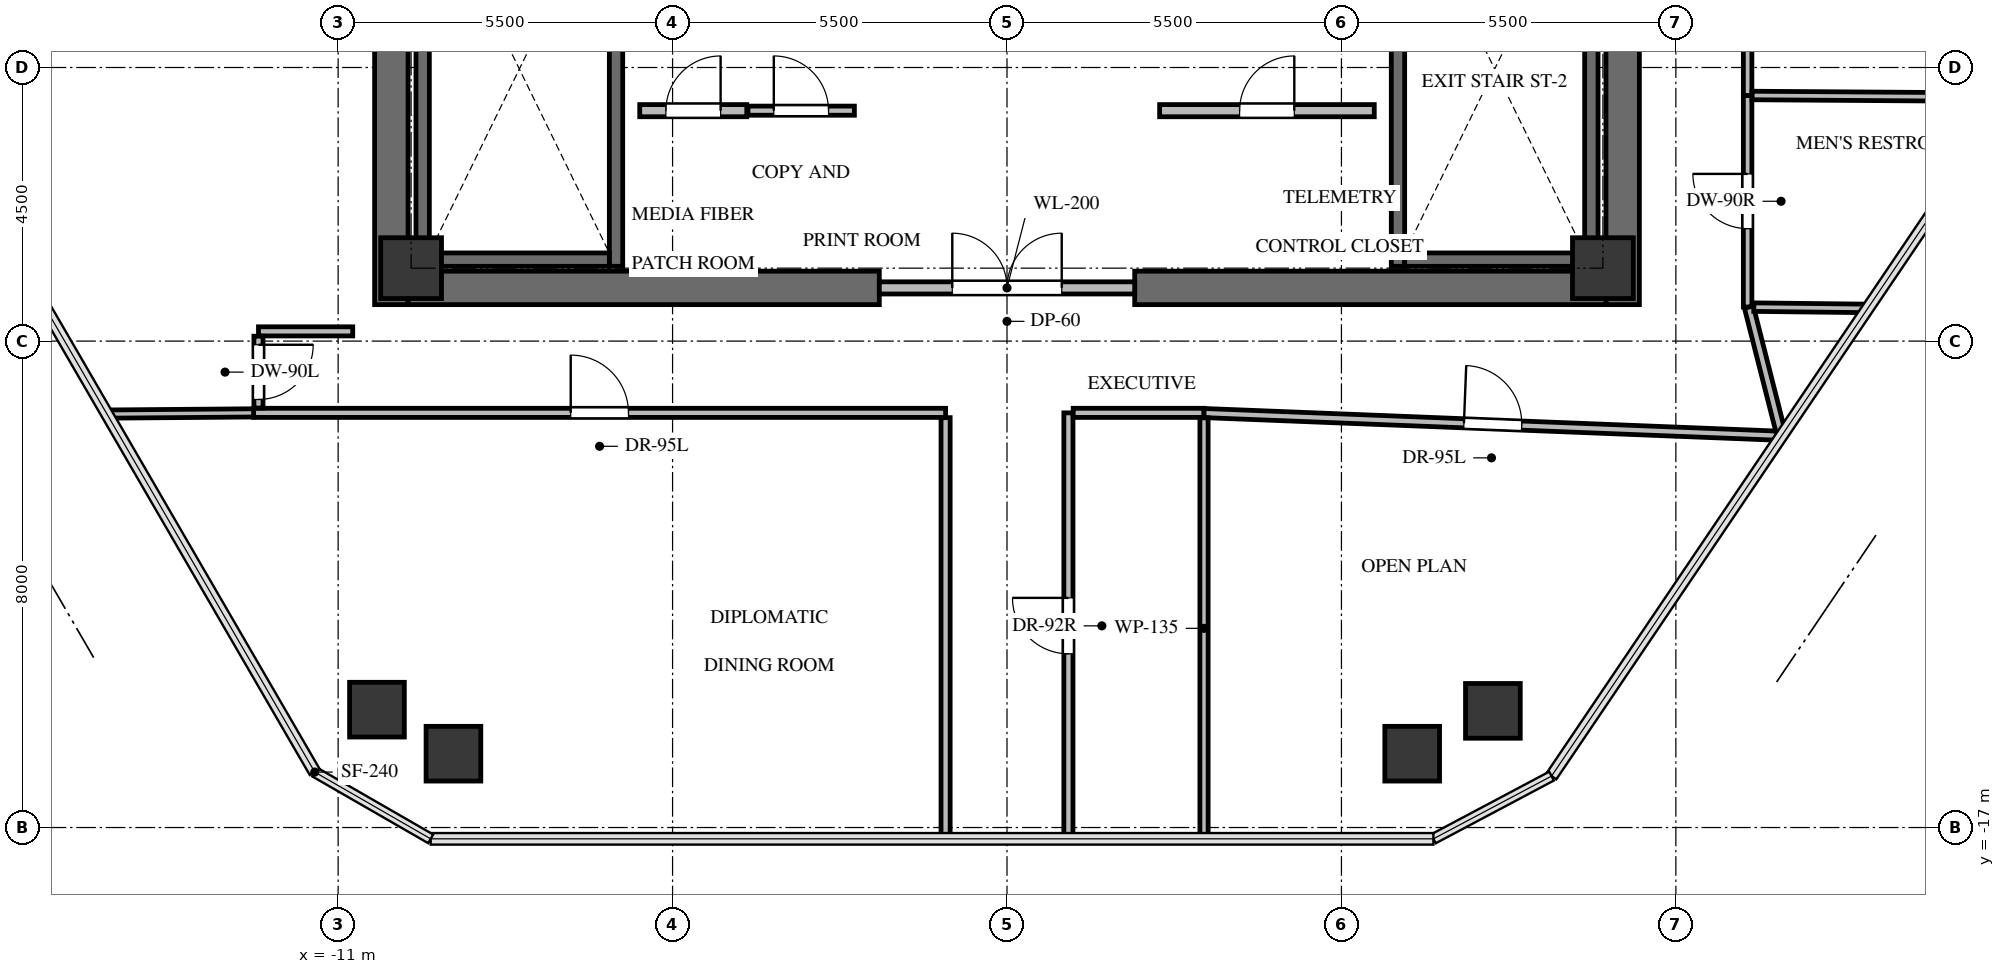
"""IFC4 building model, lengths in metres.
Left out: names, types, materials, properties, quantities, classifications, styles, units other than length and angle.
Written with IfcOpenShell. Run it as: python <this file> out.ifc"""

import sys

from ifc_helpers import new_model, si_unit, direction, frame, frame_2d, origin, origin_2d, place, context, subcontext, project, spatial, rectangle, extrude, source, transform, mapped, element, fill, save


model = new_model("IFC4")
c1 = context("Model", 3, precision=1e-05, world=origin(), true_north=direction((0.0, 1.0)))
c2 = subcontext(c1, "Body", "Model", "MODEL_VIEW")
j1 = project(units=[si_unit("LENGTHUNIT", "METRE"), si_unit("PLANEANGLEUNIT", "RADIAN")], contexts=[c1])
p1 = place(None, origin())
s1 = spatial("IfcSite", under=j1, at=p1, CompositionType="ELEMENT")
p2 = place(p1, origin())
s2 = spatial("IfcBuilding", under=s1, at=p2, CompositionType="ELEMENT")
p3 = place(p2, frame((0.0, 0.0, 221.6)))
s3 = spatial("IfcBuildingStorey", under=s2, at=p3, CompositionType="ELEMENT", Elevation=221.6)
for number, where, z_axis, x_axis in (
    (1, (-10.125, -8.4, 0.0), (0.0, 0.0, 1.0), (0.0, 1.0, 0.0)),
    (2, (10.125, -8.4, 0.0), (0.0, 0.0, 1.0), (0.0, 1.0, 0.0)),
):
    element("IfcWall", number, at=place(p3, frame(where, z_axis=z_axis, x_axis=x_axis)), inside=s3, PredefinedType="SHEAR", context=c2, shape_type="SweptSolid", body=[
        extrude(rectangle(XDim=16.8, YDim=0.55, at=frame_2d((8.4, 0.0))), origin(), (0.0, 0.0, 1.0), 3.3),
    ])
for number, where, z_axis, x_axis in (
    (3, (-9.85, -8.125, 0.0), (0.0, 0.0, 1.0), (1.0, 0.0, 0.0)),
    (4, (2.1, -8.125, 0.0), (0.0, 0.0, 1.0), (1.0, 0.0, 0.0)),
):
    element("IfcWall", number, at=place(p3, frame(where, z_axis=z_axis, x_axis=x_axis)), inside=s3, PredefinedType="SHEAR", context=c2, shape_type="SweptSolid", body=[
        extrude(rectangle(XDim=7.75, YDim=0.55, at=frame_2d((3.875, 0.0))), origin(), (0.0, 0.0, 1.0), 3.3),
    ])
p4 = place(p3, frame((-6.43, -7.77, -0.24), z_axis=(0.0, 0.0, 1.0), x_axis=(0.0, 1.0, 0.0)))
e5 = element("IfcWall", 5, at=p4, inside=s3, PredefinedType="SHEAR", context=c2, shape_type="SweptSolid", body=[
    extrude(rectangle(XDim=7.89, YDim=0.22, at=frame_2d((3.945, 0.0))), origin(), (0.0, 0.0, 1.0), 3.3),
])
p5 = place(p4, frame((6.32, 0.0, 0.0)))
e6 = element("IfcOpeningElement", 6, at=p5, cuts=e5, PredefinedType="OPENING", context=c2, shape_type="SweptSolid", body=[
    extrude(rectangle(XDim=1.05, YDim=2.15, at=frame_2d((0.525, 1.075))), frame((0.0, 0.12, 0.0), z_axis=(0.0, -1.0, 0.0), x_axis=(1.0, 0.0, 0.0)), (0.0, 0.0, 1.0), 0.24),
])
p6 = place(p3, frame((-9.61, 0.12, -0.24), z_axis=(0.0, 0.0, 1.0), x_axis=(0.0, -1.0, 0.0)))
e7 = element("IfcWall", 7, at=p6, inside=s3, PredefinedType="SHEAR", context=c2, shape_type="SweptSolid", body=[
    extrude(rectangle(XDim=7.89, YDim=0.22, at=frame_2d((3.945, 0.0))), origin(), (0.0, 0.0, 1.0), 3.3),
])
p7 = place(p3, frame((-9.5, -7.66, -0.24), z_axis=(0.0, 0.0, 1.0), x_axis=(1.0, 0.0, 0.0)))
e8 = element("IfcWall", 8, at=p7, inside=s3, PredefinedType="SHEAR", context=c2, shape_type="SweptSolid", body=[
    extrude(rectangle(XDim=2.96, YDim=0.22, at=frame_2d((1.48, 0.0))), origin(), (0.0, 0.0, 1.0), 3.3),
])
p8 = place(p3, frame((9.61, -7.77, -0.24), z_axis=(0.0, 0.0, 1.0), x_axis=(0.0, 1.0, 0.0)))
e9 = element("IfcWall", 9, at=p8, inside=s3, PredefinedType="SHEAR", context=c2, shape_type="SweptSolid", body=[
    extrude(rectangle(XDim=7.89, YDim=0.22, at=frame_2d((3.945, 0.0))), origin(), (0.0, 0.0, 1.0), 3.3),
])
p9 = place(p3, frame((6.43, 0.12, -0.24), z_axis=(0.0, 0.0, 1.0), x_axis=(0.0, -1.0, 0.0)))
e10 = element("IfcWall", 10, at=p9, inside=s3, PredefinedType="SHEAR", context=c2, shape_type="SweptSolid", body=[
    extrude(rectangle(XDim=7.89, YDim=0.22, at=frame_2d((3.945, 0.0))), origin(), (0.0, 0.0, 1.0), 3.3),
])
p10 = place(p9, frame((0.52, 0.0, 0.0)))
e11 = element("IfcOpeningElement", 11, at=p10, cuts=e10, PredefinedType="OPENING", context=c2, shape_type="SweptSolid", body=[
    extrude(rectangle(XDim=1.05, YDim=2.15, at=frame_2d((0.525, 1.075))), frame((0.0, 0.12, 0.0), z_axis=(0.0, -1.0, 0.0), x_axis=(1.0, 0.0, 0.0)), (0.0, 0.0, 1.0), 0.24),
])
p11 = place(p3, frame((6.54, -7.66, -0.24), z_axis=(0.0, 0.0, 1.0), x_axis=(1.0, 0.0, 0.0)))
e12 = element("IfcWall", 12, at=p11, inside=s3, PredefinedType="SHEAR", context=c2, shape_type="SweptSolid", body=[
    extrude(rectangle(XDim=2.96, YDim=0.22, at=frame_2d((1.48, 0.0))), origin(), (0.0, 0.0, 1.0), 3.3),
])
m1 = source(origin(), c2, "Body", "SweptSolid", [
    extrude(rectangle(XDim=1.0, YDim=1.0, at=origin_2d()), origin(), (0.0, 0.0, 1.0), 3.3),
])
for number, where, z_axis, x_axis in (
    (13, (-9.8, -7.8, -0.24), (0.0, 0.0, 1.0), (1.0, 0.0, 0.0)),
    (14, (9.8, -7.8, -0.24), (0.0, 0.0, 1.0), (1.0, 0.0, 0.0)),
):
    element("IfcColumn", number, at=place(p3, frame(where, z_axis=z_axis, x_axis=x_axis)), inside=s3, PredefinedType="COLUMN", context=c2, shape_type="MappedRepresentation", body=[
        mapped(m1, transform((0.0, 0.0, 0.0), x_axis=(1.0, 0.0, 0.0), y_axis=(0.0, 1.0, 0.0), z_axis=(0.0, 0.0, 1.0), scale=1.0)),
    ])
m2 = source(origin(), c2, "Body", "SweptSolid", [
    extrude(rectangle(XDim=0.9, YDim=0.9, at=origin_2d()), origin(), (0.0, 0.0, 1.0), 3.3),
])
for number, where, z_axis, x_axis in (
    (15, (-10.361, -15.062, -0.24), (0.0, 0.0, 1.0), (1.0, 0.0, 0.0)),
    (16, (7.991, -15.081, -0.24), (0.0, 0.0, 1.0), (1.0, 0.0, 0.0)),
    (17, (6.664, -15.786, -0.24), (0.0, 0.0, 1.0), (1.0, 0.0, 0.0)),
    (18, (-9.104, -15.786, -0.24), (0.0, 0.0, 1.0), (1.0, 0.0, 0.0)),
):
    element("IfcColumn", number, at=place(p3, frame(where, z_axis=z_axis, x_axis=x_axis)), inside=s3, PredefinedType="COLUMN", context=c2, shape_type="MappedRepresentation", body=[
        mapped(m2, transform((0.0, 0.0, 0.0), x_axis=(1.0, 0.0, 0.0), y_axis=(0.0, 1.0, 0.0), z_axis=(0.0, 0.0, 1.0), scale=1.0)),
    ])
p12 = place(p3, frame((-2.1, -8.125, 0.0), z_axis=(0.0, 0.0, 1.0), x_axis=(1.0, 0.0, 0.0)))
e19 = element("IfcWall", 19, at=p12, inside=s3, PredefinedType="SOLIDWALL", context=c2, shape_type="SweptSolid", body=[
    extrude(rectangle(XDim=4.2, YDim=0.2, at=frame_2d((2.1, 0.0))), origin(), (0.0, 0.0, 1.0), 3.045),
])
p13 = place(p12, frame((1.2, 0.0, 0.0)))
e20 = element("IfcOpeningElement", 20, at=p13, cuts=e19, PredefinedType="OPENING", context=c2, shape_type="SweptSolid", body=[
    extrude(rectangle(XDim=1.8, YDim=2.15, at=frame_2d((0.9, 1.075))), frame((0.0, 0.11, 0.0), z_axis=(0.0, -1.0, 0.0), x_axis=(1.0, 0.0, 0.0)), (0.0, 0.0, 1.0), 0.22),
])
p14 = place(p3, frame((-6.04, -5.21, 0.0), z_axis=(0.0, 0.0, 1.0), x_axis=(1.0, 0.0, 0.0)))
e21 = element("IfcWall", 21, at=p14, inside=s3, PredefinedType="SOLIDWALL", context=c2, shape_type="SweptSolid", body=[
    extrude(rectangle(XDim=1.76, YDim=0.2, at=frame_2d((0.88, 0.0))), origin(), (0.0, 0.0, 1.0), 3.045),
])
p15 = place(p14, frame((0.43, 0.0, 0.0)))
e22 = element("IfcOpeningElement", 22, at=p15, cuts=e21, PredefinedType="OPENING", context=c2, shape_type="SweptSolid", body=[
    extrude(rectangle(XDim=0.9, YDim=2.05, at=frame_2d((0.45, 1.025))), frame((0.0, 0.11, 0.0), z_axis=(0.0, -1.0, 0.0), x_axis=(1.0, 0.0, 0.0)), (0.0, 0.0, 1.0), 0.22),
])
p16 = place(p3, frame((-4.26, -5.21, 0.0), z_axis=(0.0, 0.0, 1.0), x_axis=(1.0, 0.0, 0.0)))
e23 = element("IfcWall", 23, at=p16, inside=s3, PredefinedType="PARTITIONING", context=c2, shape_type="SweptSolid", body=[
    extrude(rectangle(XDim=1.75, YDim=0.15, at=frame_2d((0.875, 0.0))), origin(), (0.0, 0.0, 1.0), 3.045),
])
p17 = place(p16, frame((0.425, 0.0, 0.0)))
e24 = element("IfcOpeningElement", 24, at=p17, cuts=e23, PredefinedType="OPENING", context=c2, shape_type="SweptSolid", body=[
    extrude(rectangle(XDim=0.9, YDim=2.05, at=frame_2d((0.45, 1.025))), frame((0.0, 0.085, 0.0), z_axis=(0.0, -1.0, 0.0), x_axis=(1.0, 0.0, 0.0)), (0.0, 0.0, 1.0), 0.17),
])
p18 = place(p3, frame((2.51, -5.21, 0.0), z_axis=(0.0, 0.0, 1.0), x_axis=(1.0, 0.0, 0.0)))
e25 = element("IfcWall", 25, at=p18, inside=s3, PredefinedType="SOLIDWALL", context=c2, shape_type="SweptSolid", body=[
    extrude(rectangle(XDim=3.53, YDim=0.2, at=frame_2d((1.765, 0.0))), origin(), (0.0, 0.0, 1.0), 3.045),
])
p19 = place(p18, frame((1.315, 0.0, 0.0)))
e26 = element("IfcOpeningElement", 26, at=p19, cuts=e25, PredefinedType="OPENING", context=c2, shape_type="SweptSolid", body=[
    extrude(rectangle(XDim=0.9, YDim=2.05, at=frame_2d((0.45, 1.025))), frame((0.0, 0.11, 0.0), z_axis=(0.0, -1.0, 0.0), x_axis=(1.0, 0.0, 0.0)), (0.0, 0.0, 1.0), 0.22),
])
p20 = place(p3, frame((12.18, -8.44, 0.0), z_axis=(0.0, 0.0, 1.0), x_axis=(0.0, 1.0, 0.0)))
e27 = element("IfcWall", 27, at=p20, inside=s3, PredefinedType="PARTITIONING", context=c2, shape_type="SweptSolid", body=[
    extrude(rectangle(XDim=3.48, YDim=0.14, at=frame_2d((1.74, 0.0))), origin(), (0.0, 0.0, 1.0), 2.399),
])
p21 = place(p20, frame((1.29, 0.0, 0.0)))
e28 = element("IfcOpeningElement", 28, at=p21, cuts=e27, PredefinedType="OPENING", context=c2, shape_type="SweptSolid", body=[
    extrude(rectangle(XDim=0.9, YDim=2.05, at=frame_2d((0.45, 1.025))), frame((0.0, 0.08, 0.0), z_axis=(0.0, -1.0, 0.0), x_axis=(1.0, 0.0, 0.0)), (0.0, 0.0, 1.0), 0.16),
])
p22 = place(p3, frame((12.18, -4.96, 0.0), z_axis=(0.0, 0.0, 1.0), x_axis=(0.0, 1.0, 0.0)))
e29 = element("IfcWall", 29, at=p22, inside=s3, PredefinedType="PARTITIONING", context=c2, shape_type="SweptSolid", body=[
    extrude(rectangle(XDim=3.4, YDim=0.14, at=frame_2d((1.7, 0.0))), origin(), (0.0, 0.0, 1.0), 3.045),
])
p23 = place(p22, frame((1.25, 0.0, 0.0)))
e30 = element("IfcOpeningElement", 30, at=p23, cuts=e29, PredefinedType="OPENING", context=c2, shape_type="SweptSolid", body=[
    extrude(rectangle(XDim=0.9, YDim=2.05, at=frame_2d((0.45, 1.025))), frame((0.0, 0.08, 0.0), z_axis=(0.0, -1.0, 0.0), x_axis=(1.0, 0.0, 0.0)), (0.0, 0.0, 1.0), 0.16),
])
p24 = place(p3, frame((-12.39, -10.18, 0.0), z_axis=(0.0, 0.0, 1.0), x_axis=(1.0, 0.0, 0.0)))
e31 = element("IfcWall", 31, at=p24, inside=s3, PredefinedType="PARTITIONING", context=c2, shape_type="SweptSolid", body=[
    extrude(rectangle(XDim=11.38, YDim=0.15, at=frame_2d((5.69, 0.0))), origin(), (0.0, 0.0, 1.0), 2.301),
])
p25 = place(p24, frame((5.215, 0.0, 0.0)))
e32 = element("IfcOpeningElement", 32, at=p25, cuts=e31, PredefinedType="OPENING", context=c2, shape_type="SweptSolid", body=[
    extrude(rectangle(XDim=0.95, YDim=2.1, at=frame_2d((0.475, 1.05))), frame((0.0, 0.085, 0.0), z_axis=(0.0, -1.0, 0.0), x_axis=(1.0, 0.0, 0.0)), (0.0, 0.0, 1.0), 0.17),
])
p26 = place(p3, frame((-1.01, -10.259, 0.0), z_axis=(0.0, 0.0, 1.0), x_axis=(0.0, -1.0, 0.0)))
e33 = element("IfcWall", 33, at=p26, inside=s3, PredefinedType="PARTITIONING", context=c2, shape_type="SweptSolid", body=[
    extrude(rectangle(XDim=6.927, YDim=0.15, at=frame_2d((3.463, 0.0))), origin(), (0.0, 0.0, 1.0), 2.399),
])
p27 = place(p3, frame((1.01, -17.186, 0.0), z_axis=(0.0, 0.0, 1.0), x_axis=(0.0, 1.0, 0.0)))
e34 = element("IfcWall", 34, at=p27, inside=s3, PredefinedType="PARTITIONING", context=c2, shape_type="SweptSolid", body=[
    extrude(rectangle(XDim=7.006, YDim=0.15, at=frame_2d((3.503, 0.0))), origin(), (0.0, 0.0, 1.0), 2.399),
])
p28 = place(p27, frame((3.043, 0.0, 0.0)))
e35 = element("IfcOpeningElement", 35, at=p28, cuts=e34, PredefinedType="OPENING", context=c2, shape_type="SweptSolid", body=[
    extrude(rectangle(XDim=0.92, YDim=2.1, at=frame_2d((0.46, 1.05))), frame((0.0, 0.085, 0.0), z_axis=(0.0, -1.0, 0.0), x_axis=(1.0, 0.0, 0.0)), (0.0, 0.0, 1.0), 0.17),
])
p29 = place(p3, frame((1.089, -10.18, 0.0), z_axis=(0.0, 0.0, 1.0), x_axis=(1.0, 0.0, 0.0)))
e36 = element("IfcWall", 36, at=p29, inside=s3, PredefinedType="PARTITIONING", context=c2, shape_type="SweptSolid", body=[
    extrude(rectangle(XDim=2.151, YDim=0.15, at=frame_2d((1.075, 0.0))), origin(), (0.0, 0.0, 1.0), 3.045),
])
p30 = place(p3, frame((3.24, -10.183, 0.0), z_axis=(0.0, 0.0, 1.0), x_axis=(0.999222675532, -0.039421373675, 0.0)))
e37 = element("IfcWall", 37, at=p30, inside=s3, PredefinedType="PARTITIONING", context=c2, shape_type="SweptSolid", body=[
    extrude(rectangle(XDim=9.506, YDim=0.15, at=frame_2d((4.753, 0.0))), origin(), (0.0, 0.0, 1.0), 2.301),
])
p31 = place(p30, frame((4.278, 0.0, 0.0)))
e38 = element("IfcOpeningElement", 38, at=p31, cuts=e37, PredefinedType="OPENING", context=c2, shape_type="SweptSolid", body=[
    extrude(rectangle(XDim=0.95, YDim=2.1, at=frame_2d((0.475, 1.05))), frame((0.0, 0.085, 0.0), z_axis=(0.0, -1.0, 0.0), x_axis=(1.0, 0.0, 0.0)), (0.0, 0.0, 1.0), 0.17),
])
p32 = place(p3, frame((12.719, -10.478, 0.0), z_axis=(0.0, 0.0, 1.0), x_axis=(-0.246494896578, 0.96914408937, 0.0)))
e39 = element("IfcWall", 39, at=p32, inside=s3, PredefinedType="PARTITIONING", context=c2, shape_type="SweptSolid", body=[
    extrude(rectangle(XDim=2.103, YDim=0.15, at=frame_2d((1.051, 0.0))), origin(), (0.0, 0.0, 1.0), 2.399),
])
p33 = place(p3, frame((-10.76, -8.84, 0.0), z_axis=(0.0, 0.0, 1.0), x_axis=(-1.0, 0.0, 0.0)))
e40 = element("IfcWall", 40, at=p33, inside=s3, PredefinedType="PARTITIONING", context=c2, shape_type="SweptSolid", body=[
    extrude(rectangle(XDim=1.55, YDim=0.15, at=frame_2d((0.775, 0.0))), origin(), (0.0, 0.0, 1.0), 3.045),
])
p34 = place(p3, frame((-12.31, -8.919, 0.0), z_axis=(0.0, 0.0, 1.0), x_axis=(0.0, -1.0, 0.0)))
e41 = element("IfcWall", 41, at=p34, inside=s3, PredefinedType="PARTITIONING", context=c2, shape_type="SweptSolid", body=[
    extrude(rectangle(XDim=1.182, YDim=0.15, at=frame_2d((0.591, 0.0))), origin(), (0.0, 0.0, 1.0), 3.045),
])
p35 = place(p34, frame((0.141, 0.0, 0.0)))
e42 = element("IfcOpeningElement", 42, at=p35, cuts=e41, PredefinedType="OPENING", context=c2, shape_type="SweptSolid", body=[
    extrude(rectangle(XDim=0.9, YDim=2.05, at=frame_2d((0.45, 1.025))), frame((0.0, 0.085, 0.0), z_axis=(0.0, -1.0, 0.0), x_axis=(1.0, 0.0, 0.0)), (0.0, 0.0, 1.0), 0.17),
])
p36 = place(p3, frame((12.254, -4.96, 0.0), z_axis=(0.0, 0.0, 1.0), x_axis=(0.999976630429, -0.006836563198, 0.0)))
e43 = element("IfcWall", 43, at=p36, inside=s3, PredefinedType="PARTITIONING", context=c2, shape_type="SweptSolid", body=[
    extrude(rectangle(XDim=4.25, YDim=0.14, at=frame_2d((2.125, 0.0))), origin(), (0.0, 0.0, 1.0), 2.399),
])
p37 = place(p3, frame((14.156, -8.462, 0.0), z_axis=(0.0, 0.0, 1.0), x_axis=(-0.999935742613, 0.011336253532, 0.0)))
e44 = element("IfcWall", 44, at=p37, inside=s3, PredefinedType="PARTITIONING", context=c2, shape_type="SweptSolid", body=[
    extrude(rectangle(XDim=1.874, YDim=0.14, at=frame_2d((0.937, 0.0))), origin(), (0.0, 0.0, 1.0), 2.399),
])
p38 = place(p3, frame((-14.802, -10.2, 0.0), z_axis=(0.0, 0.0, 1.0), x_axis=(0.999968020968, 0.007997314604, 0.0)))
e45 = element("IfcWall", 45, at=p38, inside=s3, PredefinedType="PARTITIONING", context=c2, shape_type="SweptSolid", body=[
    extrude(rectangle(XDim=2.412, YDim=0.135, at=frame_2d((1.206, 0.0))), origin(), (0.0, 0.0, 1.0), 2.399),
])
p39 = place(p3, frame((3.24, -10.262, 0.0), z_axis=(0.0, 0.0, 1.0), x_axis=(0.0, -1.0, 0.0)))
e46 = element("IfcWall", 46, at=p39, inside=s3, PredefinedType="PARTITIONING", context=c2, shape_type="SweptSolid", body=[
    extrude(rectangle(XDim=6.924, YDim=0.135, at=frame_2d((3.462, 0.0))), origin(), (0.0, 0.0, 1.0), 2.399),
])
m3 = source(origin(), c2, "Body", "SweptSolid", [
    extrude(rectangle(XDim=1.8, YDim=2.15, at=frame_2d((0.9, 1.075))), frame((0.0, 0.025, 0.0), z_axis=(0.0, -1.0, 0.0), x_axis=(1.0, 0.0, 0.0)), (0.0, 0.0, 1.0), 0.05),
])
p40 = place(p13, origin())
e47 = element("IfcDoor", 47, at=p40, inside=s3, OperationType="DOUBLE_DOOR_SINGLE_SWING", PredefinedType="DOOR", context=c2, shape_type="MappedRepresentation", body=[
    mapped(m3, transform((0.0, 0.0, 0.0), x_axis=(1.0, 0.0, 0.0), y_axis=(0.0, 1.0, 0.0), z_axis=(0.0, 0.0, 1.0), scale=1.0)),
])
fill(e20, e47)
m4 = source(origin(), c2, "Body", "SweptSolid", [
    extrude(rectangle(XDim=0.9, YDim=2.05, at=frame_2d((0.45, 1.025))), frame((0.0, 0.025, 0.0), z_axis=(0.0, -1.0, 0.0), x_axis=(1.0, 0.0, 0.0)), (0.0, 0.0, 1.0), 0.05),
])
p41 = place(p15, origin())
e48 = element("IfcDoor", 48, at=p41, inside=s3, OperationType="SINGLE_SWING_RIGHT", PredefinedType="DOOR", context=c2, shape_type="MappedRepresentation", body=[
    mapped(m4, transform((0.0, 0.0, 0.0), x_axis=(1.0, 0.0, 0.0), y_axis=(0.0, 1.0, 0.0), z_axis=(0.0, 0.0, 1.0), scale=1.0)),
])
fill(e22, e48)
m5 = source(origin(), c2, "Body", "SweptSolid", [
    extrude(rectangle(XDim=0.9, YDim=2.05, at=frame_2d((0.45, 1.025))), frame((0.0, 0.025, 0.0), z_axis=(0.0, -1.0, 0.0), x_axis=(1.0, 0.0, 0.0)), (0.0, 0.0, 1.0), 0.05),
])
p42 = place(p17, origin())
e49 = element("IfcDoor", 49, at=p42, inside=s3, OperationType="SINGLE_SWING_LEFT", PredefinedType="DOOR", context=c2, shape_type="MappedRepresentation", body=[
    mapped(m5, transform((0.0, 0.0, 0.0), x_axis=(1.0, 0.0, 0.0), y_axis=(0.0, 1.0, 0.0), z_axis=(0.0, 0.0, 1.0), scale=1.0)),
])
fill(e24, e49)
p43 = place(p19, origin())
e50 = element("IfcDoor", 50, at=p43, inside=s3, OperationType="SINGLE_SWING_RIGHT", PredefinedType="DOOR", context=c2, shape_type="MappedRepresentation", body=[
    mapped(m4, transform((0.0, 0.0, 0.0), x_axis=(1.0, 0.0, 0.0), y_axis=(0.0, 1.0, 0.0), z_axis=(0.0, 0.0, 1.0), scale=1.0)),
])
fill(e26, e50)
m6 = source(origin(), c2, "Body", "SweptSolid", [
    extrude(rectangle(XDim=0.9, YDim=2.05, at=frame_2d((0.45, 1.025))), frame((0.0, 0.025, 0.0), z_axis=(0.0, -1.0, 0.0), x_axis=(1.0, 0.0, 0.0)), (0.0, 0.0, 1.0), 0.05),
])
p44 = place(p21, origin())
e51 = element("IfcDoor", 51, at=p44, inside=s3, OperationType="SINGLE_SWING_RIGHT", PredefinedType="DOOR", context=c2, shape_type="MappedRepresentation", body=[
    mapped(m6, transform((0.0, 0.0, 0.0), x_axis=(1.0, 0.0, 0.0), y_axis=(0.0, 1.0, 0.0), z_axis=(0.0, 0.0, 1.0), scale=1.0)),
])
fill(e28, e51)
m7 = source(origin(), c2, "Body", "SweptSolid", [
    extrude(rectangle(XDim=0.95, YDim=2.1, at=frame_2d((0.475, 1.05))), frame((0.0, 0.025, 0.0), z_axis=(0.0, -1.0, 0.0), x_axis=(1.0, 0.0, 0.0)), (0.0, 0.0, 1.0), 0.05),
])
p45 = place(p25, origin())
e52 = element("IfcDoor", 52, at=p45, inside=s3, OperationType="SINGLE_SWING_LEFT", PredefinedType="DOOR", context=c2, shape_type="MappedRepresentation", body=[
    mapped(m7, transform((0.0, 0.0, 0.0), x_axis=(1.0, 0.0, 0.0), y_axis=(0.0, 1.0, 0.0), z_axis=(0.0, 0.0, 1.0), scale=1.0)),
])
fill(e32, e52)
m8 = source(origin(), c2, "Body", "SweptSolid", [
    extrude(rectangle(XDim=0.92, YDim=2.1, at=frame_2d((0.46, 1.05))), frame((0.0, 0.025, 0.0), z_axis=(0.0, -1.0, 0.0), x_axis=(1.0, 0.0, 0.0)), (0.0, 0.0, 1.0), 0.05),
])
p46 = place(p28, origin())
e53 = element("IfcDoor", 53, at=p46, inside=s3, OperationType="SINGLE_SWING_RIGHT", PredefinedType="DOOR", context=c2, shape_type="MappedRepresentation", body=[
    mapped(m8, transform((0.0, 0.0, 0.0), x_axis=(1.0, 0.0, 0.0), y_axis=(0.0, 1.0, 0.0), z_axis=(0.0, 0.0, 1.0), scale=1.0)),
])
fill(e35, e53)
p47 = place(p31, origin())
e54 = element("IfcDoor", 54, at=p47, inside=s3, OperationType="SINGLE_SWING_LEFT", PredefinedType="DOOR", context=c2, shape_type="MappedRepresentation", body=[
    mapped(m7, transform((0.0, 0.0, 0.0), x_axis=(1.0, 0.0, 0.0), y_axis=(0.0, 1.0, 0.0), z_axis=(0.0, 0.0, 1.0), scale=1.0)),
])
fill(e38, e54)
m9 = source(origin(), c2, "Body", "SweptSolid", [
    extrude(rectangle(XDim=0.9, YDim=2.05, at=frame_2d((0.45, 1.025))), frame((0.0, 0.025, 0.0), z_axis=(0.0, -1.0, 0.0), x_axis=(1.0, 0.0, 0.0)), (0.0, 0.0, 1.0), 0.05),
])
p48 = place(p35, origin())
e55 = element("IfcDoor", 55, at=p48, inside=s3, OperationType="SINGLE_SWING_LEFT", PredefinedType="DOOR", context=c2, shape_type="MappedRepresentation", body=[
    mapped(m9, transform((0.0, 0.0, 0.0), x_axis=(1.0, 0.0, 0.0), y_axis=(0.0, 1.0, 0.0), z_axis=(0.0, 0.0, 1.0), scale=1.0)),
])
fill(e42, e55)
save(model, sys.argv[1])
